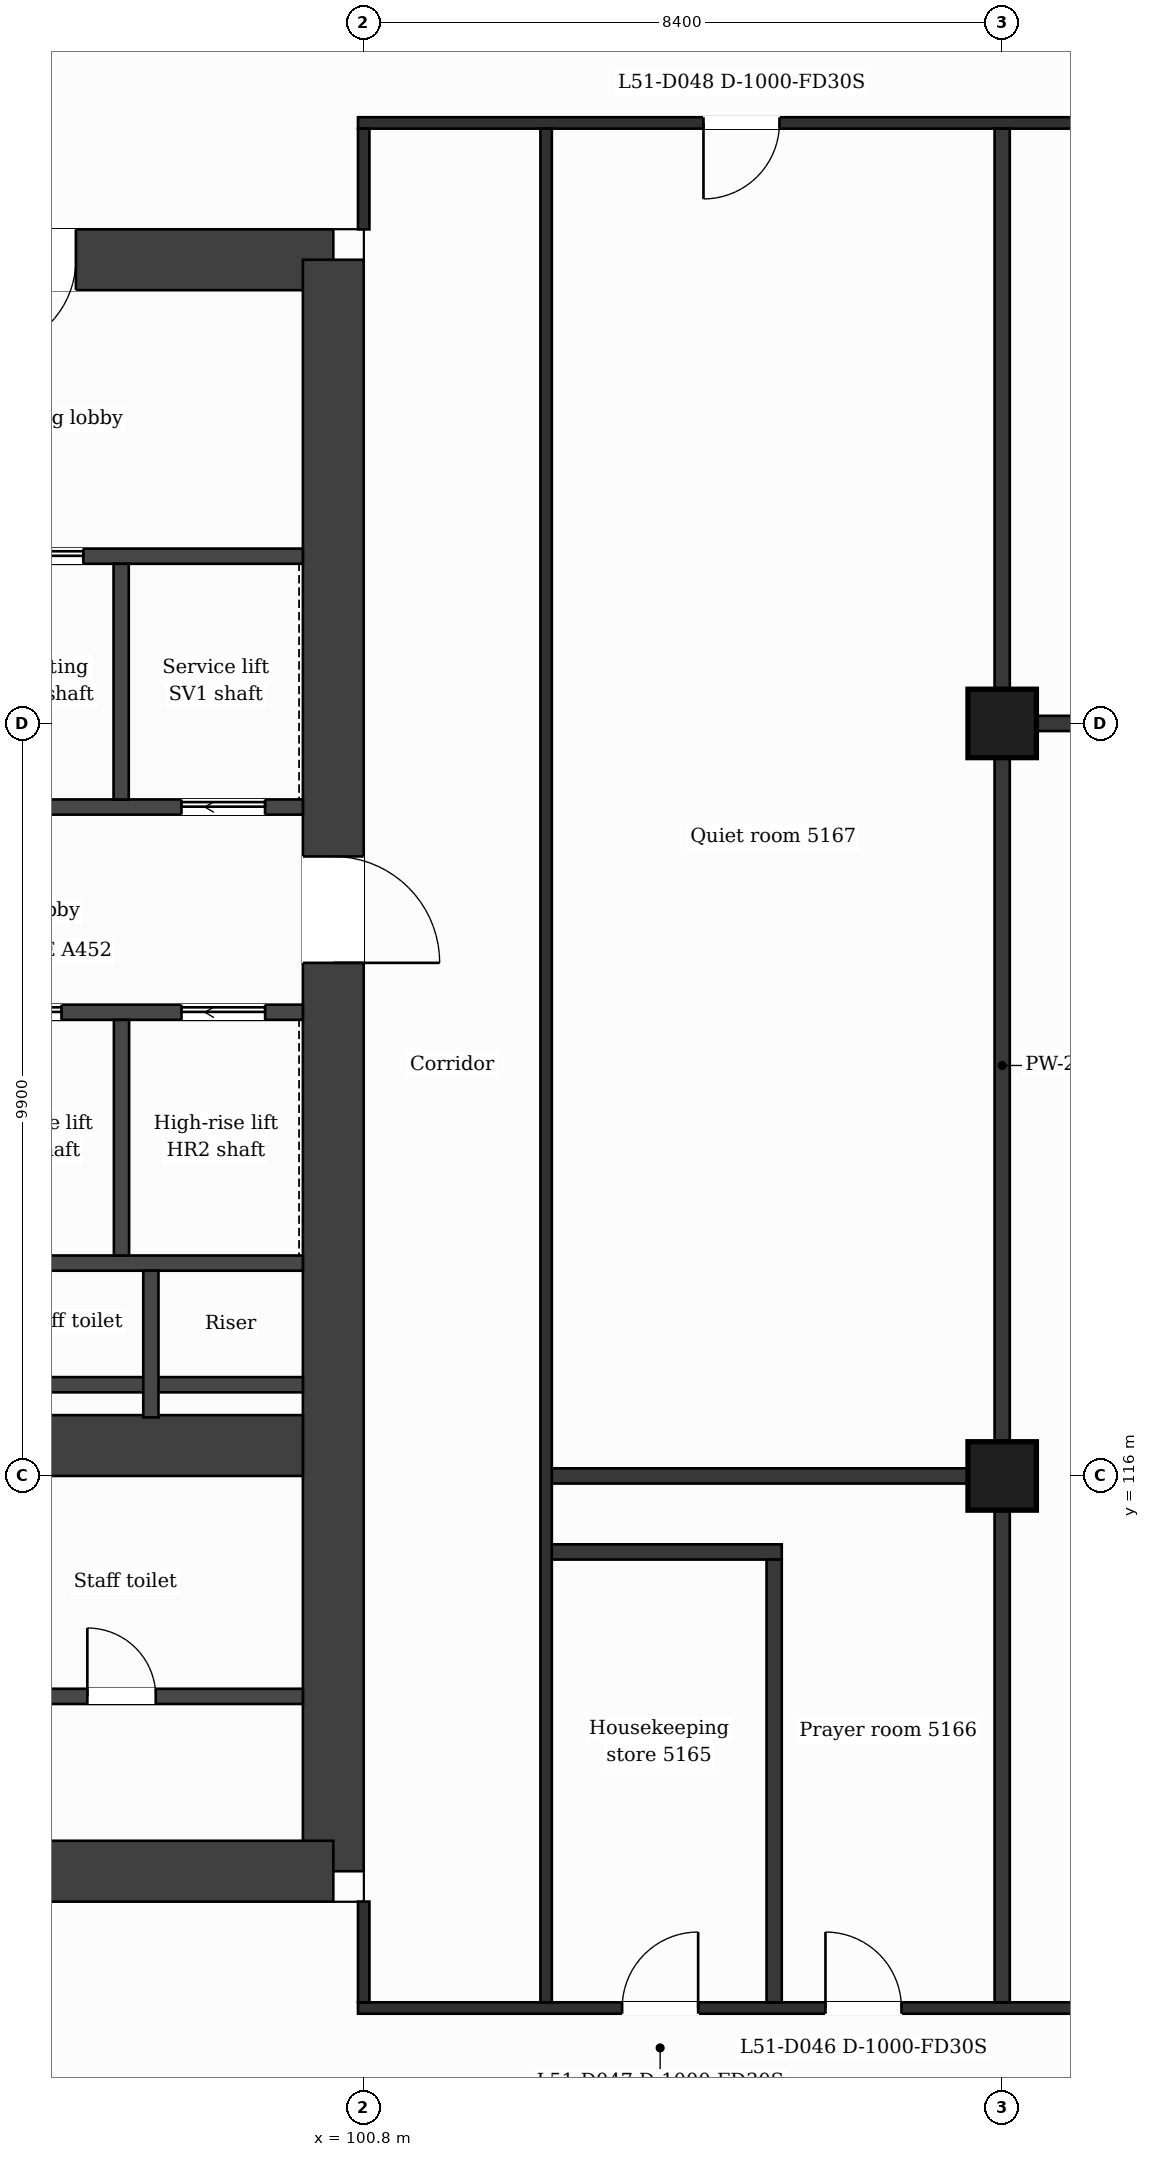
"""IFC4 building model, lengths in metres.
Left out: names, types, materials, properties, quantities, classifications, styles, units other than length and angle.
Written with IfcOpenShell. Run it as: python <this file> out.ifc"""

import sys

from ifc_helpers import new_model, si_unit, direction, frame, frame_2d, origin, origin_2d, place, context, subcontext, project, spatial, rectangle, extrude, element, fill, save


model = new_model("IFC4")
c1 = context("Model", 3, precision=1e-05, world=origin(), true_north=direction((0.0, 1.0)))
c2 = subcontext(c1, "Body", "Model", "MODEL_VIEW")
j1 = project(units=[si_unit("LENGTHUNIT", "METRE"), si_unit("PLANEANGLEUNIT", "RADIAN")], contexts=[c1])
p1 = place(None, origin())
s1 = spatial("IfcSite", under=j1, at=p1, CompositionType="ELEMENT")
p2 = place(p1, origin())
s2 = spatial("IfcBuilding", under=s1, at=p2, CompositionType="ELEMENT")
p3 = place(p2, frame((0.0, 0.0, 213.3)))
s3 = spatial("IfcBuildingStorey", under=s2, at=p3, CompositionType="ELEMENT", Elevation=213.3)
p4 = place(p3, frame((88.98, 132.0, 0.0), z_axis=(0.0, 0.0, 1.0), x_axis=(1.0, 0.0, 0.0)))
e1 = element("IfcWall", 1, at=p4, inside=s3, PredefinedType="SHEAR", context=c2, shape_type="SweptSolid", body=[
    extrude(rectangle(XDim=11.419, YDim=0.8, at=frame_2d((5.71, 0.0))), origin(), (0.0, 0.0, 1.0), 3.7),
])
p5 = place(p4, frame((6.833, 0.0, 0.0)))
e2 = element("IfcOpeningElement", 2, at=p5, cuts=e1, PredefinedType="OPENING", context=c2, shape_type="SweptSolid", body=[
    extrude(rectangle(XDim=1.2, YDim=2.1, at=frame_2d((0.6, 1.05))), frame((0.0, 0.41, 0.0), z_axis=(0.0, -1.0, 0.0), x_axis=(1.0, 0.0, 0.0)), (0.0, 0.0, 1.0), 0.82),
])
p6 = place(p3, frame((100.4, 132.0, 0.0), z_axis=(0.0, 0.0, 1.0), x_axis=(0.0, -1.0, 0.0)))
e3 = element("IfcWall", 3, at=p6, inside=s3, PredefinedType="SHEAR", context=c2, shape_type="SweptSolid", body=[
    extrude(rectangle(XDim=21.2, YDim=0.8, at=frame_2d((10.6, 0.0))), origin(), (0.0, 0.0, 1.0), 3.7),
])
p7 = place(p6, frame((7.85, 0.0, 0.0)))
e4 = element("IfcOpeningElement", 4, at=p7, cuts=e3, PredefinedType="OPENING", context=c2, shape_type="SweptSolid", body=[
    extrude(rectangle(XDim=1.4, YDim=2.1, at=frame_2d((0.7, 1.05))), frame((0.0, 0.41, 0.0), z_axis=(0.0, -1.0, 0.0), x_axis=(1.0, 0.0, 0.0)), (0.0, 0.0, 1.0), 0.82),
])
p8 = place(p3, frame((100.4, 110.8, 0.0), z_axis=(0.0, 0.0, 1.0), x_axis=(-1.0, 0.0, 0.0)))
e5 = element("IfcWall", 5, at=p8, inside=s3, PredefinedType="SHEAR", context=c2, shape_type="SweptSolid", body=[
    extrude(rectangle(XDim=14.273, YDim=0.8, at=frame_2d((7.137, 0.0))), origin(), (0.0, 0.0, 1.0), 3.7),
])
p9 = place(p8, frame((5.908, 0.0, 0.0)))
e6 = element("IfcOpeningElement", 6, at=p9, cuts=e5, PredefinedType="OPENING", context=c2, shape_type="SweptSolid", body=[
    extrude(rectangle(XDim=1.4, YDim=2.1, at=frame_2d((0.7, 1.05))), frame((0.0, 0.41, 0.0), z_axis=(0.0, -1.0, 0.0), x_axis=(1.0, 0.0, 0.0)), (0.0, 0.0, 1.0), 0.82),
])
p10 = place(p3, frame((94.7, 116.4, 0.0), z_axis=(0.0, 0.0, 1.0), x_axis=(1.0, 0.0, 0.0)))
e7 = element("IfcWall", 7, at=p10, inside=s3, PredefinedType="SHEAR", context=c2, shape_type="SweptSolid", body=[
    extrude(rectangle(XDim=5.3, YDim=0.8, at=frame_2d((2.65, 0.0))), origin(), (0.0, 0.0, 1.0), 3.7),
])
for number, where, z_axis, x_axis in (
    (8, (109.2, 116.0, 0.0), (0.0, 0.0, 1.0), (1.0, 0.0, 0.0)),
    (9, (109.2, 125.9, 0.0), (0.0, 0.0, 1.0), (1.0, 0.0, 0.0)),
):
    element("IfcColumn", number, at=place(p3, frame(where, z_axis=z_axis, x_axis=x_axis)), inside=s3, PredefinedType="COLUMN", context=c2, shape_type="SweptSolid", body=[
        extrude(rectangle(XDim=0.9, YDim=0.9, at=origin_2d()), origin(), (0.0, 0.0, 1.0), 3.7),
    ])
p11 = place(p3, frame((100.725, 109.0, 0.0), z_axis=(0.0, 0.0, 1.0), x_axis=(1.0, 0.0, 0.0)))
e10 = element("IfcWall", 10, at=p11, inside=s3, PredefinedType="PARTITIONING", context=c2, shape_type="SweptSolid", body=[
    extrude(rectangle(XDim=25.35, YDim=0.15, at=frame_2d((12.675, 0.0))), origin(), (0.0, 0.0, 1.0), 3.38),
])
p12 = place(p11, frame((6.15, 0.0, 0.0)))
e11 = element("IfcOpeningElement", 11, at=p12, cuts=e10, PredefinedType="OPENING", context=c2, shape_type="SweptSolid", body=[
    extrude(rectangle(XDim=1.0, YDim=2.1, at=frame_2d((0.5, 1.05))), frame((0.0, 0.085, 0.0), z_axis=(0.0, -1.0, 0.0), x_axis=(1.0, 0.0, 0.0)), (0.0, 0.0, 1.0), 0.17),
])
p13 = place(p11, frame((3.475, 0.0, 0.0)))
e12 = element("IfcOpeningElement", 12, at=p13, cuts=e10, PredefinedType="OPENING", context=c2, shape_type="SweptSolid", body=[
    extrude(rectangle(XDim=1.0, YDim=2.1, at=frame_2d((0.5, 1.05))), frame((0.0, 0.085, 0.0), z_axis=(0.0, -1.0, 0.0), x_axis=(1.0, 0.0, 0.0)), (0.0, 0.0, 1.0), 0.17),
])
p14 = place(p11, frame((12.175, 0.0, 0.0)))
e13 = element("IfcOpeningElement", 13, at=p14, cuts=e10, PredefinedType="OPENING", context=c2, shape_type="SweptSolid", body=[
    extrude(rectangle(XDim=1.0, YDim=2.1, at=frame_2d((0.5, 1.05))), frame((0.0, 0.085, 0.0), z_axis=(0.0, -1.0, 0.0), x_axis=(1.0, 0.0, 0.0)), (0.0, 0.0, 1.0), 0.17),
])
p15 = place(p11, frame((20.45, 0.0, 0.0)))
e14 = element("IfcOpeningElement", 14, at=p15, cuts=e10, PredefinedType="OPENING", context=c2, shape_type="SweptSolid", body=[
    extrude(rectangle(XDim=1.0, YDim=2.1, at=frame_2d((0.5, 1.05))), frame((0.0, 0.085, 0.0), z_axis=(0.0, -1.0, 0.0), x_axis=(1.0, 0.0, 0.0)), (0.0, 0.0, 1.0), 0.17),
])
p16 = place(p3, frame((95.127, 113.1, 0.0), z_axis=(0.0, 0.0, 1.0), x_axis=(1.0, 0.0, 0.0)))
e15 = element("IfcWall", 15, at=p16, inside=s3, PredefinedType="PARTITIONING", context=c2, shape_type="SweptSolid", body=[
    extrude(rectangle(XDim=4.873, YDim=0.2, at=frame_2d((2.437, 0.0))), origin(), (0.0, 0.0, 1.0), 3.38),
])
p17 = place(p16, frame((2.037, 0.0, 0.0)))
e16 = element("IfcOpeningElement", 16, at=p17, cuts=e15, PredefinedType="OPENING", context=c2, shape_type="SweptSolid", body=[
    extrude(rectangle(XDim=0.9, YDim=2.1, at=frame_2d((0.45, 1.05))), frame((0.0, 0.11, 0.0), z_axis=(0.0, -1.0, 0.0), x_axis=(1.0, 0.0, 0.0)), (0.0, 0.0, 1.0), 0.22),
])
p18 = place(p3, frame((103.2, 115.0, 0.0), z_axis=(0.0, 0.0, 1.0), x_axis=(1.0, 0.0, 0.0)))
e17 = element("IfcWall", 17, at=p18, inside=s3, PredefinedType="PARTITIONING", context=c2, shape_type="SweptSolid", body=[
    extrude(rectangle(XDim=3.1, YDim=0.2, at=frame_2d((1.55, 0.0))), origin(), (0.0, 0.0, 1.0), 3.38),
])
p19 = place(p3, frame((103.2, 116.0, 0.0), z_axis=(0.0, 0.0, 1.0), x_axis=(1.0, 0.0, 0.0)))
e18 = element("IfcWall", 18, at=p19, inside=s3, PredefinedType="PARTITIONING", context=c2, shape_type="SweptSolid", body=[
    extrude(rectangle(XDim=6.0, YDim=0.2, at=frame_2d((3.0, 0.0))), origin(), (0.0, 0.0, 1.0), 3.38),
])
for number, where, z_axis, x_axis in (
    (19, (95.227, 117.2, 0.0), (0.0, 0.0, 1.0), (1.0, 0.0, 0.0)),
    (20, (95.227, 118.8, 0.0), (0.0, 0.0, 1.0), (1.0, 0.0, 0.0)),
):
    element("IfcWall", number, at=place(p3, frame(where, z_axis=z_axis, x_axis=x_axis)), inside=s3, PredefinedType="PARTITIONING", context=c2, shape_type="SweptSolid", body=[
        extrude(rectangle(XDim=4.773, YDim=0.2, at=frame_2d((2.386, 0.0))), origin(), (0.0, 0.0, 1.0), 3.38),
    ])
p20 = place(p3, frame((95.227, 122.1, 0.0), z_axis=(0.0, 0.0, 1.0), x_axis=(1.0, 0.0, 0.0)))
e21 = element("IfcWall", 21, at=p20, inside=s3, PredefinedType="PARTITIONING", context=c2, shape_type="SweptSolid", body=[
    extrude(rectangle(XDim=4.773, YDim=0.2, at=frame_2d((2.386, 0.0))), origin(), (0.0, 0.0, 1.0), 3.38),
])
p21 = place(p20, frame((0.497, 0.0, 0.0)))
e22 = element("IfcOpeningElement", 22, at=p21, cuts=e21, PredefinedType="OPENING", context=c2, shape_type="SweptSolid", body=[
    extrude(rectangle(XDim=1.1, YDim=2.1, at=frame_2d((0.55, 1.05))), frame((0.0, 0.11, 0.0), z_axis=(0.0, -1.0, 0.0), x_axis=(1.0, 0.0, 0.0)), (0.0, 0.0, 1.0), 0.22),
])
p22 = place(p20, frame((3.176, 0.0, 0.0)))
e23 = element("IfcOpeningElement", 23, at=p22, cuts=e21, PredefinedType="OPENING", context=c2, shape_type="SweptSolid", body=[
    extrude(rectangle(XDim=1.1, YDim=2.1, at=frame_2d((0.55, 1.05))), frame((0.0, 0.11, 0.0), z_axis=(0.0, -1.0, 0.0), x_axis=(1.0, 0.0, 0.0)), (0.0, 0.0, 1.0), 0.22),
])
p23 = place(p3, frame((92.702, 124.8, 0.0), z_axis=(0.0, 0.0, 1.0), x_axis=(1.0, 0.0, 0.0)))
e24 = element("IfcWall", 24, at=p23, inside=s3, PredefinedType="PARTITIONING", context=c2, shape_type="SweptSolid", body=[
    extrude(rectangle(XDim=7.298, YDim=0.2, at=frame_2d((3.649, 0.0))), origin(), (0.0, 0.0, 1.0), 3.38),
])
p24 = place(p23, frame((5.7, 0.0, 0.0)))
e25 = element("IfcOpeningElement", 25, at=p24, cuts=e24, PredefinedType="OPENING", context=c2, shape_type="SweptSolid", body=[
    extrude(rectangle(XDim=1.1, YDim=2.1, at=frame_2d((0.55, 1.05))), frame((0.0, 0.11, 0.0), z_axis=(0.0, -1.0, 0.0), x_axis=(1.0, 0.0, 0.0)), (0.0, 0.0, 1.0), 0.22),
])
p25 = place(p3, frame((109.2, 125.9, 0.0), z_axis=(0.0, 0.0, 1.0), x_axis=(1.0, 0.0, 0.0)))
e26 = element("IfcWall", 26, at=p25, inside=s3, PredefinedType="PARTITIONING", context=c2, shape_type="SweptSolid", body=[
    extrude(rectangle(XDim=8.4, YDim=0.2, at=frame_2d((4.2, 0.0))), origin(), (0.0, 0.0, 1.0), 3.38),
])
p26 = place(p3, frame((92.827, 128.1, 0.0), z_axis=(0.0, 0.0, 1.0), x_axis=(1.0, 0.0, 0.0)))
e27 = element("IfcWall", 27, at=p26, inside=s3, PredefinedType="PARTITIONING", context=c2, shape_type="SweptSolid", body=[
    extrude(rectangle(XDim=7.173, YDim=0.2, at=frame_2d((3.586, 0.0))), origin(), (0.0, 0.0, 1.0), 3.38),
])
p27 = place(p26, frame((3.184, 0.0, 0.0)))
e28 = element("IfcOpeningElement", 28, at=p27, cuts=e27, PredefinedType="OPENING", context=c2, shape_type="SweptSolid", body=[
    extrude(rectangle(XDim=1.1, YDim=2.1, at=frame_2d((0.55, 1.05))), frame((0.0, 0.11, 0.0), z_axis=(0.0, -1.0, 0.0), x_axis=(1.0, 0.0, 0.0)), (0.0, 0.0, 1.0), 0.22),
])
p28 = place(p3, frame((100.725, 133.8, 0.0), z_axis=(0.0, 0.0, 1.0), x_axis=(1.0, 0.0, 0.0)))
e29 = element("IfcWall", 29, at=p28, inside=s3, PredefinedType="PARTITIONING", context=c2, shape_type="SweptSolid", body=[
    extrude(rectangle(XDim=25.35, YDim=0.15, at=frame_2d((12.675, 0.0))), origin(), (0.0, 0.0, 1.0), 3.38),
])
p29 = place(p28, frame((4.545, 0.0, 0.0)))
e30 = element("IfcOpeningElement", 30, at=p29, cuts=e29, PredefinedType="OPENING", context=c2, shape_type="SweptSolid", body=[
    extrude(rectangle(XDim=1.0, YDim=2.1, at=frame_2d((0.5, 1.05))), frame((0.0, 0.085, 0.0), z_axis=(0.0, -1.0, 0.0), x_axis=(1.0, 0.0, 0.0)), (0.0, 0.0, 1.0), 0.17),
])
p30 = place(p28, frame((12.845, 0.0, 0.0)))
e31 = element("IfcOpeningElement", 31, at=p30, cuts=e29, PredefinedType="OPENING", context=c2, shape_type="SweptSolid", body=[
    extrude(rectangle(XDim=1.0, YDim=2.1, at=frame_2d((0.5, 1.05))), frame((0.0, 0.085, 0.0), z_axis=(0.0, -1.0, 0.0), x_axis=(1.0, 0.0, 0.0)), (0.0, 0.0, 1.0), 0.17),
])
p31 = place(p28, frame((20.45, 0.0, 0.0)))
e32 = element("IfcOpeningElement", 32, at=p31, cuts=e29, PredefinedType="OPENING", context=c2, shape_type="SweptSolid", body=[
    extrude(rectangle(XDim=1.0, YDim=2.1, at=frame_2d((0.5, 1.05))), frame((0.0, 0.085, 0.0), z_axis=(0.0, -1.0, 0.0), x_axis=(1.0, 0.0, 0.0)), (0.0, 0.0, 1.0), 0.17),
])
for number, where, z_axis, x_axis in (
    (33, (97.609, 124.9, 0.0), (0.0, 0.0, 1.0), (0.0, 1.0, 0.0)),
    (34, (97.614, 118.9, 0.0), (0.0, 0.0, 1.0), (0.0, 1.0, 0.0)),
):
    element("IfcWall", number, at=place(p3, frame(where, z_axis=z_axis, x_axis=x_axis)), inside=s3, PredefinedType="PARTITIONING", context=c2, shape_type="SweptSolid", body=[
        extrude(rectangle(XDim=3.1, YDim=0.2, at=frame_2d((1.55, 0.0))), origin(), (0.0, 0.0, 1.0), 3.38),
    ])
p32 = place(p3, frame((98.0, 116.77, 0.0), z_axis=(0.0, 0.0, 1.0), x_axis=(0.0, 1.0, 0.0)))
e35 = element("IfcWall", 35, at=p32, inside=s3, PredefinedType="PARTITIONING", context=c2, shape_type="SweptSolid", body=[
    extrude(rectangle(XDim=1.93, YDim=0.2, at=frame_2d((0.965, 0.0))), origin(), (0.0, 0.0, 1.0), 3.38),
])
p33 = place(p3, frame((100.8, 109.075, 0.0), z_axis=(0.0, 0.0, 1.0), x_axis=(0.0, 1.0, 0.0)))
e36 = element("IfcWall", 36, at=p33, inside=s3, PredefinedType="PARTITIONING", context=c2, shape_type="SweptSolid", body=[
    extrude(rectangle(XDim=1.325, YDim=0.15, at=frame_2d((0.663, 0.0))), origin(), (0.0, 0.0, 1.0), 3.38),
])
p34 = place(p3, frame((100.8, 132.4, 0.0), z_axis=(0.0, 0.0, 1.0), x_axis=(0.0, 1.0, 0.0)))
e37 = element("IfcWall", 37, at=p34, inside=s3, PredefinedType="PARTITIONING", context=c2, shape_type="SweptSolid", body=[
    extrude(rectangle(XDim=1.325, YDim=0.15, at=frame_2d((0.663, 0.0))), origin(), (0.0, 0.0, 1.0), 3.38),
])
p35 = place(p3, frame((103.2, 109.075, 0.0), z_axis=(0.0, 0.0, 1.0), x_axis=(0.0, 1.0, 0.0)))
e38 = element("IfcWall", 38, at=p35, inside=s3, PredefinedType="PARTITIONING", context=c2, shape_type="SweptSolid", body=[
    extrude(rectangle(XDim=24.65, YDim=0.15, at=frame_2d((12.325, 0.0))), origin(), (0.0, 0.0, 1.0), 3.38),
])
p36 = place(p3, frame((106.2, 109.075, 0.0), z_axis=(0.0, 0.0, 1.0), x_axis=(0.0, 1.0, 0.0)))
e39 = element("IfcWall", 39, at=p36, inside=s3, PredefinedType="PARTITIONING", context=c2, shape_type="SweptSolid", body=[
    extrude(rectangle(XDim=5.825, YDim=0.2, at=frame_2d((2.913, 0.0))), origin(), (0.0, 0.0, 1.0), 3.38),
])
p37 = place(p3, frame((109.2, 109.075, 0.0), z_axis=(0.0, 0.0, 1.0), x_axis=(0.0, 1.0, 0.0)))
e40 = element("IfcWall", 40, at=p37, inside=s3, PredefinedType="PARTITIONING", context=c2, shape_type="SweptSolid", body=[
    extrude(rectangle(XDim=24.65, YDim=0.2, at=frame_2d((12.325, 0.0))), origin(), (0.0, 0.0, 1.0), 3.38),
])
p38 = place(p21, origin())
e41 = element("IfcDoor", 41, at=p38, inside=s3, OperationType="SLIDING_TO_LEFT", PredefinedType="DOOR", context=c2, shape_type="SweptSolid", body=[
    extrude(rectangle(XDim=1.1, YDim=2.1, at=frame_2d((0.55, 1.05))), frame((0.0, 0.025, 0.0), z_axis=(0.0, -1.0, 0.0), x_axis=(1.0, 0.0, 0.0)), (0.0, 0.0, 1.0), 0.05),
])
fill(e22, e41)
p39 = place(p22, origin())
e42 = element("IfcDoor", 42, at=p39, inside=s3, OperationType="SLIDING_TO_LEFT", PredefinedType="DOOR", context=c2, shape_type="SweptSolid", body=[
    extrude(rectangle(XDim=1.1, YDim=2.1, at=frame_2d((0.55, 1.05))), frame((0.0, 0.025, 0.0), z_axis=(0.0, -1.0, 0.0), x_axis=(1.0, 0.0, 0.0)), (0.0, 0.0, 1.0), 0.05),
])
fill(e23, e42)
p40 = place(p27, origin())
e43 = element("IfcDoor", 43, at=p40, inside=s3, OperationType="SLIDING_TO_LEFT", PredefinedType="DOOR", context=c2, shape_type="SweptSolid", body=[
    extrude(rectangle(XDim=1.1, YDim=2.1, at=frame_2d((0.55, 1.05))), frame((0.0, 0.025, 0.0), z_axis=(0.0, -1.0, 0.0), x_axis=(1.0, 0.0, 0.0)), (0.0, 0.0, 1.0), 0.05),
])
fill(e28, e43)
p41 = place(p24, origin())
e44 = element("IfcDoor", 44, at=p41, inside=s3, OperationType="SLIDING_TO_LEFT", PredefinedType="DOOR", context=c2, shape_type="SweptSolid", body=[
    extrude(rectangle(XDim=1.1, YDim=2.1, at=frame_2d((0.55, 1.05))), frame((0.0, 0.025, 0.0), z_axis=(0.0, -1.0, 0.0), x_axis=(1.0, 0.0, 0.0)), (0.0, 0.0, 1.0), 0.05),
])
fill(e25, e44)
p42 = place(p17, origin())
e45 = element("IfcDoor", 45, at=p42, inside=s3, OperationType="SINGLE_SWING_LEFT", PredefinedType="DOOR", context=c2, shape_type="SweptSolid", body=[
    extrude(rectangle(XDim=0.9, YDim=2.1, at=frame_2d((0.45, 1.05))), frame((0.0, 0.025, 0.0), z_axis=(0.0, -1.0, 0.0), x_axis=(1.0, 0.0, 0.0)), (0.0, 0.0, 1.0), 0.05),
])
fill(e16, e45)
p43 = place(p12, origin())
e46 = element("IfcDoor", 46, at=p43, inside=s3, OperationType="SINGLE_SWING_LEFT", PredefinedType="DOOR", context=c2, shape_type="SweptSolid", body=[
    extrude(rectangle(XDim=1.0, YDim=2.1, at=frame_2d((0.5, 1.05))), frame((0.0, 0.025, 0.0), z_axis=(0.0, -1.0, 0.0), x_axis=(1.0, 0.0, 0.0)), (0.0, 0.0, 1.0), 0.05),
])
fill(e11, e46)
p44 = place(p13, origin())
e47 = element("IfcDoor", 47, at=p44, inside=s3, OperationType="SINGLE_SWING_RIGHT", PredefinedType="DOOR", context=c2, shape_type="SweptSolid", body=[
    extrude(rectangle(XDim=1.0, YDim=2.1, at=frame_2d((0.5, 1.05))), frame((0.0, 0.025, 0.0), z_axis=(0.0, -1.0, 0.0), x_axis=(1.0, 0.0, 0.0)), (0.0, 0.0, 1.0), 0.05),
])
fill(e12, e47)
p45 = place(p29, origin())
e48 = element("IfcDoor", 48, at=p45, inside=s3, OperationType="SINGLE_SWING_LEFT", PredefinedType="DOOR", context=c2, shape_type="SweptSolid", body=[
    extrude(rectangle(XDim=1.0, YDim=2.1, at=frame_2d((0.5, 1.05))), frame((0.0, 0.025, 0.0), z_axis=(0.0, -1.0, 0.0), x_axis=(1.0, 0.0, 0.0)), (0.0, 0.0, 1.0), 0.05),
])
fill(e30, e48)
p46 = place(p5, origin())
e49 = element("IfcDoor", 49, at=p46, inside=s3, OperationType="SINGLE_SWING_LEFT", PredefinedType="DOOR", context=c2, shape_type="SweptSolid", body=[
    extrude(rectangle(XDim=1.2, YDim=2.1, at=frame_2d((0.6, 1.05))), frame((0.0, 0.025, 0.0), z_axis=(0.0, -1.0, 0.0), x_axis=(1.0, 0.0, 0.0)), (0.0, 0.0, 1.0), 0.05),
])
fill(e2, e49)
p47 = place(p7, origin())
e50 = element("IfcDoor", 50, at=p47, inside=s3, OperationType="SINGLE_SWING_RIGHT", PredefinedType="DOOR", context=c2, shape_type="SweptSolid", body=[
    extrude(rectangle(XDim=1.4, YDim=2.1, at=frame_2d((0.7, 1.05))), frame((0.0, 0.025, 0.0), z_axis=(0.0, -1.0, 0.0), x_axis=(1.0, 0.0, 0.0)), (0.0, 0.0, 1.0), 0.05),
])
fill(e4, e50)
save(model, sys.argv[1])
